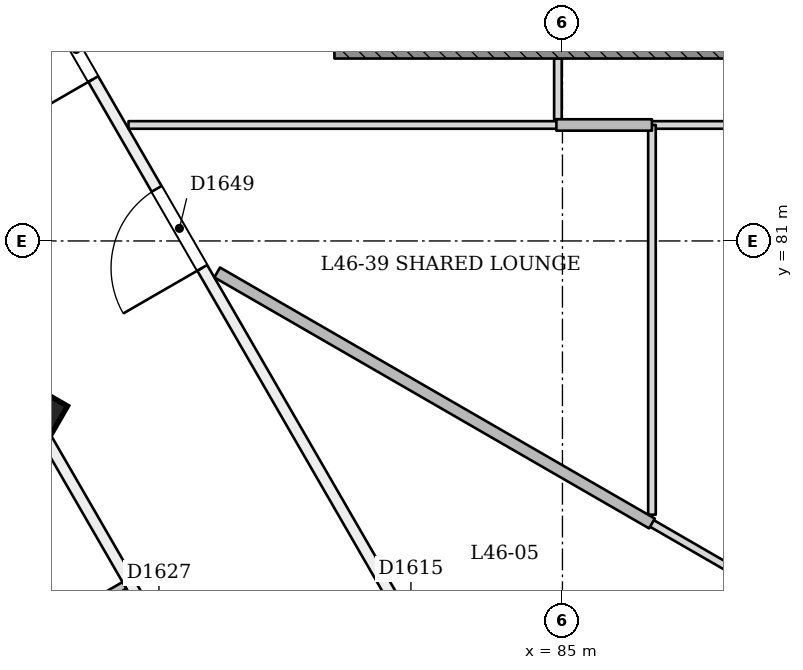
"""IFC4 building model, lengths in metres.
Left out: names, types, materials, properties, quantities, classifications, styles, units other than length and angle.
Written with IfcOpenShell. Run it as: python <this file> out.ifc"""

import sys

from ifc_helpers import new_model, si_unit, direction, frame, frame_2d, origin, origin_2d, place, context, subcontext, project, spatial, rectangle, extrude, element, fill, save


model = new_model("IFC4")
c1 = context("Model", 3, precision=1e-05, world=origin(), true_north=direction((0.0, 1.0)))
c2 = subcontext(c1, "Body", "Model", "MODEL_VIEW")
j1 = project(units=[si_unit("LENGTHUNIT", "METRE"), si_unit("PLANEANGLEUNIT", "RADIAN")], contexts=[c1])
p1 = place(None, origin())
s1 = spatial("IfcSite", under=j1, at=p1, CompositionType="ELEMENT")
p2 = place(p1, origin())
s2 = spatial("IfcBuilding", under=s1, at=p2, CompositionType="ELEMENT")
p3 = place(p2, frame((0.0, 0.0, 178.2)))
s3 = spatial("IfcBuildingStorey", under=s2, at=p3, CompositionType="ELEMENT", Elevation=178.2)
p4 = place(p3, frame((78.052, 78.671, -0.018), z_axis=(0.022222910879, 0.038415824599, 0.999014697916), x_axis=(-0.866022865462, -0.498524997193, 0.038434667567)))
e1 = element("IfcColumn", 1, at=p4, inside=s3, PredefinedType="COLUMN", context=c2, shape_type="SweptSolid", body=[
    extrude(rectangle(XDim=0.6, YDim=0.6, at=origin_2d()), origin(), (0.0, 0.0, 1.0), 3.604),
])
p5 = place(p3, frame((95.255, 90.2, 0.0), z_axis=(0.0, 0.0, 1.0), x_axis=(-0.499996558816, -0.866027390544, 0.0)))
e2 = element("IfcWall", 2, at=p5, inside=s3, PredefinedType="PARTITIONING", context=c2, shape_type="SweptSolid", body=[
    extrude(rectangle(XDim=20.38, YDim=0.15, at=frame_2d((10.19, 0.0))), origin(), (0.0, 0.0, 1.0), 3.15),
])
p6 = place(p5, frame((11.902, 0.0, 0.0)))
e3 = element("IfcOpeningElement", 3, at=p6, cuts=e2, PredefinedType="OPENING", context=c2, shape_type="SweptSolid", body=[
    extrude(rectangle(XDim=0.9, YDim=2.1, at=frame_2d((0.45, 1.05))), frame((0.0, 0.085, 0.0), z_axis=(0.0, -1.0, 0.0), x_axis=(1.0, 0.0, 0.0)), (0.0, 0.0, 1.0), 0.171),
])
p7 = place(p5, frame((7.233, 0.0, 0.0)))
e4 = element("IfcOpeningElement", 4, at=p7, cuts=e2, PredefinedType="OPENING", context=c2, shape_type="SweptSolid", body=[
    extrude(rectangle(XDim=1.0, YDim=2.1, at=frame_2d((0.5, 1.05))), frame((0.0, 0.085, 0.0), z_axis=(0.0, -1.0, 0.0), x_axis=(1.0, 0.0, 0.0)), (0.0, 0.0, 1.0), 0.171),
])
p8 = place(p5, frame((2.898, 0.0, 0.0)))
e5 = element("IfcOpeningElement", 5, at=p8, cuts=e2, PredefinedType="OPENING", context=c2, shape_type="SweptSolid", body=[
    extrude(rectangle(XDim=1.0, YDim=2.1, at=frame_2d((0.5, 1.05))), frame((0.0, 0.085, 0.0), z_axis=(0.0, -1.0, 0.0), x_axis=(1.0, 0.0, 0.0)), (0.0, 0.0, 1.0), 0.171),
])
p9 = place(p3, frame((85.0, 72.438, 0.0), z_axis=(0.0, 0.0, 1.0), x_axis=(-0.500000320199, 0.866025218918, 0.0)))
e6 = element("IfcWall", 6, at=p9, inside=s3, PredefinedType="PARTITIONING", context=c2, shape_type="SweptSolid", body=[
    extrude(rectangle(XDim=20.51, YDim=0.15, at=frame_2d((10.255, 0.0))), origin(), (0.0, 0.0, 1.0), 3.15),
])
p10 = place(p9, frame((12.346, 0.0, 0.0)))
e7 = element("IfcOpeningElement", 7, at=p10, cuts=e6, PredefinedType="OPENING", context=c2, shape_type="SweptSolid", body=[
    extrude(rectangle(XDim=0.9, YDim=2.1, at=frame_2d((0.45, 1.05))), frame((0.0, 0.085, 0.0), z_axis=(0.0, -1.0, 0.0), x_axis=(1.0, 0.0, 0.0)), (0.0, 0.0, 1.0), 0.171),
])
p11 = place(p9, frame((3.487, 0.0, 0.0)))
e8 = element("IfcOpeningElement", 8, at=p11, cuts=e6, PredefinedType="OPENING", context=c2, shape_type="SweptSolid", body=[
    extrude(rectangle(XDim=1.0, YDim=2.1, at=frame_2d((0.5, 1.05))), frame((0.0, 0.085, 0.0), z_axis=(0.0, -1.0, 0.0), x_axis=(1.0, 0.0, 0.0)), (0.0, 0.0, 1.0), 0.171),
])
p12 = place(p9, frame((16.612, 0.0, 0.0)))
e9 = element("IfcOpeningElement", 9, at=p12, cuts=e6, PredefinedType="OPENING", context=c2, shape_type="SweptSolid", body=[
    extrude(rectangle(XDim=1.2, YDim=2.1, at=frame_2d((0.6, 1.05))), frame((0.0, 0.085, 0.0), z_axis=(0.0, -1.0, 0.0), x_axis=(1.0, 0.0, 0.0)), (0.0, 0.0, 1.0), 0.171),
])
p13 = place(p9, frame((9.478, 0.0, 0.0)))
e10 = element("IfcOpeningElement", 10, at=p13, cuts=e6, PredefinedType="OPENING", context=c2, shape_type="SweptSolid", body=[
    extrude(rectangle(XDim=1.2, YDim=2.1, at=frame_2d((0.6, 1.05))), frame((0.0, 0.085, 0.0), z_axis=(0.0, -1.0, 0.0), x_axis=(1.0, 0.0, 0.0)), (0.0, 0.0, 1.0), 0.171),
])
p14 = place(p3, frame((71.396, 90.2, 0.0), z_axis=(0.0, 0.0, 1.0), x_axis=(0.500000568002, -0.866025075848, 0.0)))
e11 = element("IfcWall", 11, at=p14, inside=s3, PredefinedType="PARTITIONING", context=c2, shape_type="SweptSolid", body=[
    extrude(rectangle(XDim=27.077, YDim=0.15, at=frame_2d((13.539, 0.0))), origin(), (0.0, 0.0, 1.0), 2.75),
])
p15 = place(p14, frame((0.419, 0.0, 0.0)))
e12 = element("IfcOpeningElement", 12, at=p15, cuts=e11, PredefinedType="OPENING", context=c2, shape_type="SweptSolid", body=[
    extrude(rectangle(XDim=1.0, YDim=2.1, at=frame_2d((0.5, 1.05))), frame((0.0, 0.085, 0.0), z_axis=(0.0, -1.0, 0.0), x_axis=(1.0, 0.0, 0.0)), (0.0, 0.0, 1.0), 0.171),
])
p16 = place(p14, frame((7.091, 0.0, 0.0)))
e13 = element("IfcOpeningElement", 13, at=p16, cuts=e11, PredefinedType="OPENING", context=c2, shape_type="SweptSolid", body=[
    extrude(rectangle(XDim=1.0, YDim=2.1, at=frame_2d((0.5, 1.05))), frame((0.0, 0.085, 0.0), z_axis=(0.0, -1.0, 0.0), x_axis=(1.0, 0.0, 0.0)), (0.0, 0.0, 1.0), 0.171),
])
p17 = place(p14, frame((9.532, 0.0, 0.0)))
e14 = element("IfcOpeningElement", 14, at=p17, cuts=e11, PredefinedType="OPENING", context=c2, shape_type="SweptSolid", body=[
    extrude(rectangle(XDim=1.0, YDim=2.1, at=frame_2d((0.5, 1.05))), frame((0.0, 0.085, 0.0), z_axis=(0.0, -1.0, 0.0), x_axis=(1.0, 0.0, 0.0)), (0.0, 0.0, 1.0), 0.171),
])
p18 = place(p14, frame((16.091, 0.0, 0.0)))
e15 = element("IfcOpeningElement", 15, at=p18, cuts=e11, PredefinedType="OPENING", context=c2, shape_type="SweptSolid", body=[
    extrude(rectangle(XDim=1.0, YDim=2.1, at=frame_2d((0.5, 1.05))), frame((0.0, 0.085, 0.0), z_axis=(0.0, -1.0, 0.0), x_axis=(1.0, 0.0, 0.0)), (0.0, 0.0, 1.0), 0.171),
])
p19 = place(p14, frame((18.416, 0.0, 0.0)))
e16 = element("IfcOpeningElement", 16, at=p19, cuts=e11, PredefinedType="OPENING", context=c2, shape_type="SweptSolid", body=[
    extrude(rectangle(XDim=1.0, YDim=2.1, at=frame_2d((0.5, 1.05))), frame((0.0, 0.085, 0.0), z_axis=(0.0, -1.0, 0.0), x_axis=(1.0, 0.0, 0.0)), (0.0, 0.0, 1.0), 0.171),
])
p20 = place(p14, frame((25.432, 0.0, 0.0)))
e17 = element("IfcOpeningElement", 17, at=p20, cuts=e11, PredefinedType="OPENING", context=c2, shape_type="SweptSolid", body=[
    extrude(rectangle(XDim=1.2, YDim=2.1, at=frame_2d((0.6, 1.05))), frame((0.0, 0.085, 0.0), z_axis=(0.0, -1.0, 0.0), x_axis=(1.0, 0.0, 0.0)), (0.0, 0.0, 1.0), 0.171),
])
p21 = place(p3, frame((85.0, 66.638, 0.0), z_axis=(0.0, 0.0, 1.0), x_axis=(0.499999498748, 0.866025693182, 0.0)))
e18 = element("IfcWall", 18, at=p21, inside=s3, PredefinedType="PARTITIONING", context=c2, shape_type="SweptSolid", body=[
    extrude(rectangle(XDim=27.207, YDim=0.15, at=frame_2d((13.604, 0.0))), origin(), (0.0, 0.0, 1.0), 2.75),
])
p22 = place(p21, frame((1.0, 0.0, 0.0)))
e19 = element("IfcOpeningElement", 19, at=p22, cuts=e18, PredefinedType="OPENING", context=c2, shape_type="SweptSolid", body=[
    extrude(rectangle(XDim=1.0, YDim=2.1, at=frame_2d((0.5, 1.05))), frame((0.0, 0.085, 0.0), z_axis=(0.0, -1.0, 0.0), x_axis=(1.0, 0.0, 0.0)), (0.0, 0.0, 1.0), 0.171),
])
p23 = place(p21, frame((7.791, 0.0, 0.0)))
e20 = element("IfcOpeningElement", 20, at=p23, cuts=e18, PredefinedType="OPENING", context=c2, shape_type="SweptSolid", body=[
    extrude(rectangle(XDim=1.0, YDim=2.1, at=frame_2d((0.5, 1.05))), frame((0.0, 0.085, 0.0), z_axis=(0.0, -1.0, 0.0), x_axis=(1.0, 0.0, 0.0)), (0.0, 0.0, 1.0), 0.171),
])
p24 = place(p21, frame((10.0, 0.0, 0.0)))
e21 = element("IfcOpeningElement", 21, at=p24, cuts=e18, PredefinedType="OPENING", context=c2, shape_type="SweptSolid", body=[
    extrude(rectangle(XDim=1.0, YDim=2.1, at=frame_2d((0.5, 1.05))), frame((0.0, 0.085, 0.0), z_axis=(0.0, -1.0, 0.0), x_axis=(1.0, 0.0, 0.0)), (0.0, 0.0, 1.0), 0.171),
])
p25 = place(p21, frame((16.791, 0.0, 0.0)))
e22 = element("IfcOpeningElement", 22, at=p25, cuts=e18, PredefinedType="OPENING", context=c2, shape_type="SweptSolid", body=[
    extrude(rectangle(XDim=1.0, YDim=2.1, at=frame_2d((0.5, 1.05))), frame((0.0, 0.085, 0.0), z_axis=(0.0, -1.0, 0.0), x_axis=(1.0, 0.0, 0.0)), (0.0, 0.0, 1.0), 0.171),
])
p26 = place(p21, frame((23.293, 0.0, 0.0)))
e23 = element("IfcOpeningElement", 23, at=p26, cuts=e18, PredefinedType="OPENING", context=c2, shape_type="SweptSolid", body=[
    extrude(rectangle(XDim=1.2, YDim=2.1, at=frame_2d((0.6, 1.05))), frame((0.0, 0.085, 0.0), z_axis=(0.0, -1.0, 0.0), x_axis=(1.0, 0.0, 0.0)), (0.0, 0.0, 1.0), 0.171),
])
p27 = place(p3, frame((90.709, 82.526, 0.0), z_axis=(0.0, 0.0, 1.0), x_axis=(-1.0, 0.0, 0.0)))
e24 = element("IfcWall", 24, at=p27, inside=s3, PredefinedType="PARTITIONING", context=c2, shape_type="SweptSolid", body=[
    extrude(rectangle(XDim=4.552, YDim=0.1, at=frame_2d((2.276, 0.0))), origin(), (0.0, 0.0, 1.0), 3.15),
])
p28 = place(p3, frame((86.157, 77.295, 0.0), z_axis=(0.0, 0.0, 1.0), x_axis=(0.866044168464, -0.499967497213, 0.0)))
e25 = element("IfcWall", 25, at=p28, inside=s3, PredefinedType="PARTITIONING", context=c2, shape_type="SweptSolid", body=[
    extrude(rectangle(XDim=1.351, YDim=0.1, at=frame_2d((0.676, 0.0))), origin(), (0.0, 0.0, 1.0), 3.15),
])
p29 = place(p3, frame((86.177, 82.526, 0.0), z_axis=(0.0, 0.0, 1.0), x_axis=(0.0, -1.0, 0.0)))
e26 = element("IfcWall", 26, at=p29, inside=s3, PredefinedType="PARTITIONING", context=c2, shape_type="SweptSolid", body=[
    extrude(rectangle(XDim=5.127, YDim=0.1, at=frame_2d((2.563, 0.0))), origin(), (0.0, 0.0, 1.0), 3.15),
])
p30 = place(p3, frame((84.94, 82.601, 0.0), z_axis=(0.0, 0.0, 1.0), x_axis=(0.0, 1.0, 0.0)))
e27 = element("IfcWall", 27, at=p30, inside=s3, PredefinedType="PARTITIONING", context=c2, shape_type="SweptSolid", body=[
    extrude(rectangle(XDim=0.799, YDim=0.1, at=frame_2d((0.399, 0.0))), origin(), (0.0, 0.0, 1.0), 3.15),
])
p31 = place(p3, frame((79.291, 82.526, 0.0), z_axis=(0.0, 0.0, 1.0), x_axis=(1.0, 0.0, 0.0)))
e28 = element("IfcWall", 28, at=p31, inside=s3, PredefinedType="PARTITIONING", context=c2, shape_type="SweptSolid", body=[
    extrude(rectangle(XDim=5.669, YDim=0.1, at=frame_2d((2.835, 0.0))), origin(), (0.0, 0.0, 1.0), 3.15),
])
p32 = place(p3, frame((84.92, 82.526, 0.0), z_axis=(0.0, 0.0, 1.0), x_axis=(1.0, 0.0, 0.0)))
e29 = element("IfcWall", 29, at=p32, inside=s3, PredefinedType="PARTITIONING", context=c2, shape_type="SweptSolid", body=[
    extrude(rectangle(XDim=1.257, YDim=0.15, at=frame_2d((0.628, 0.0))), origin(), (0.0, 0.0, 1.0), 3.15),
])
p33 = place(p3, frame((86.177, 77.283, 0.0), z_axis=(0.0, 0.0, 1.0), x_axis=(-0.866021233572, 0.500007222951, 0.0)))
e30 = element("IfcWall", 30, at=p33, inside=s3, PredefinedType="PARTITIONING", context=c2, shape_type="SweptSolid", body=[
    extrude(rectangle(XDim=6.605, YDim=0.15, at=frame_2d((3.302, 0.0))), origin(), (0.0, 0.0, 1.0), 3.15),
])
p34 = place(p3, frame((79.237, 76.469, 0.0), z_axis=(0.0, 0.0, 1.0), x_axis=(-0.866011447264, -0.500024172624, 0.0)))
e31 = element("IfcWall", 31, at=p34, inside=s3, PredefinedType="PARTITIONING", context=c2, shape_type="SweptSolid", body=[
    extrude(rectangle(XDim=2.825, YDim=0.1, at=frame_2d((1.413, 0.0))), origin(), (0.0, 0.0, 1.0), 3.15),
])
p35 = place(p3, frame((82.0, 83.5, 0.0), z_axis=(0.0, 0.0, 1.0), x_axis=(1.0, 0.0, 0.0)))
e32 = element("IfcWall", 32, at=p35, inside=s3, PredefinedType="SOLIDWALL", context=c2, shape_type="SweptSolid", body=[
    extrude(rectangle(XDim=6.0, YDim=0.2, at=frame_2d((3.0, 0.0))), origin(), (0.0, 0.0, 1.0), 3.15),
])
p36 = place(p10, origin())
e33 = element("IfcDoor", 33, at=p36, inside=s3, OperationType="SINGLE_SWING_LEFT", PredefinedType="NOTDEFINED", context=c2, shape_type="SweptSolid", body=[
    extrude(rectangle(XDim=0.9, YDim=2.1, at=frame_2d((0.45, 1.05))), frame((0.0, 0.025, 0.0), z_axis=(0.0, -1.0, 0.0), x_axis=(1.0, 0.0, 0.0)), (0.0, 0.0, 1.0), 0.05),
])
fill(e7, e33)
p37 = place(p13, origin())
e34 = element("IfcDoor", 34, at=p37, inside=s3, OperationType="SINGLE_SWING_LEFT", PredefinedType="NOTDEFINED", context=c2, shape_type="SweptSolid", body=[
    extrude(rectangle(XDim=1.2, YDim=2.1, at=frame_2d((0.6, 1.05))), frame((0.0, 0.025, 0.0), z_axis=(0.0, -1.0, 0.0), x_axis=(1.0, 0.0, 0.0)), (0.0, 0.0, 1.0), 0.05),
])
fill(e10, e34)
save(model, sys.argv[1])
